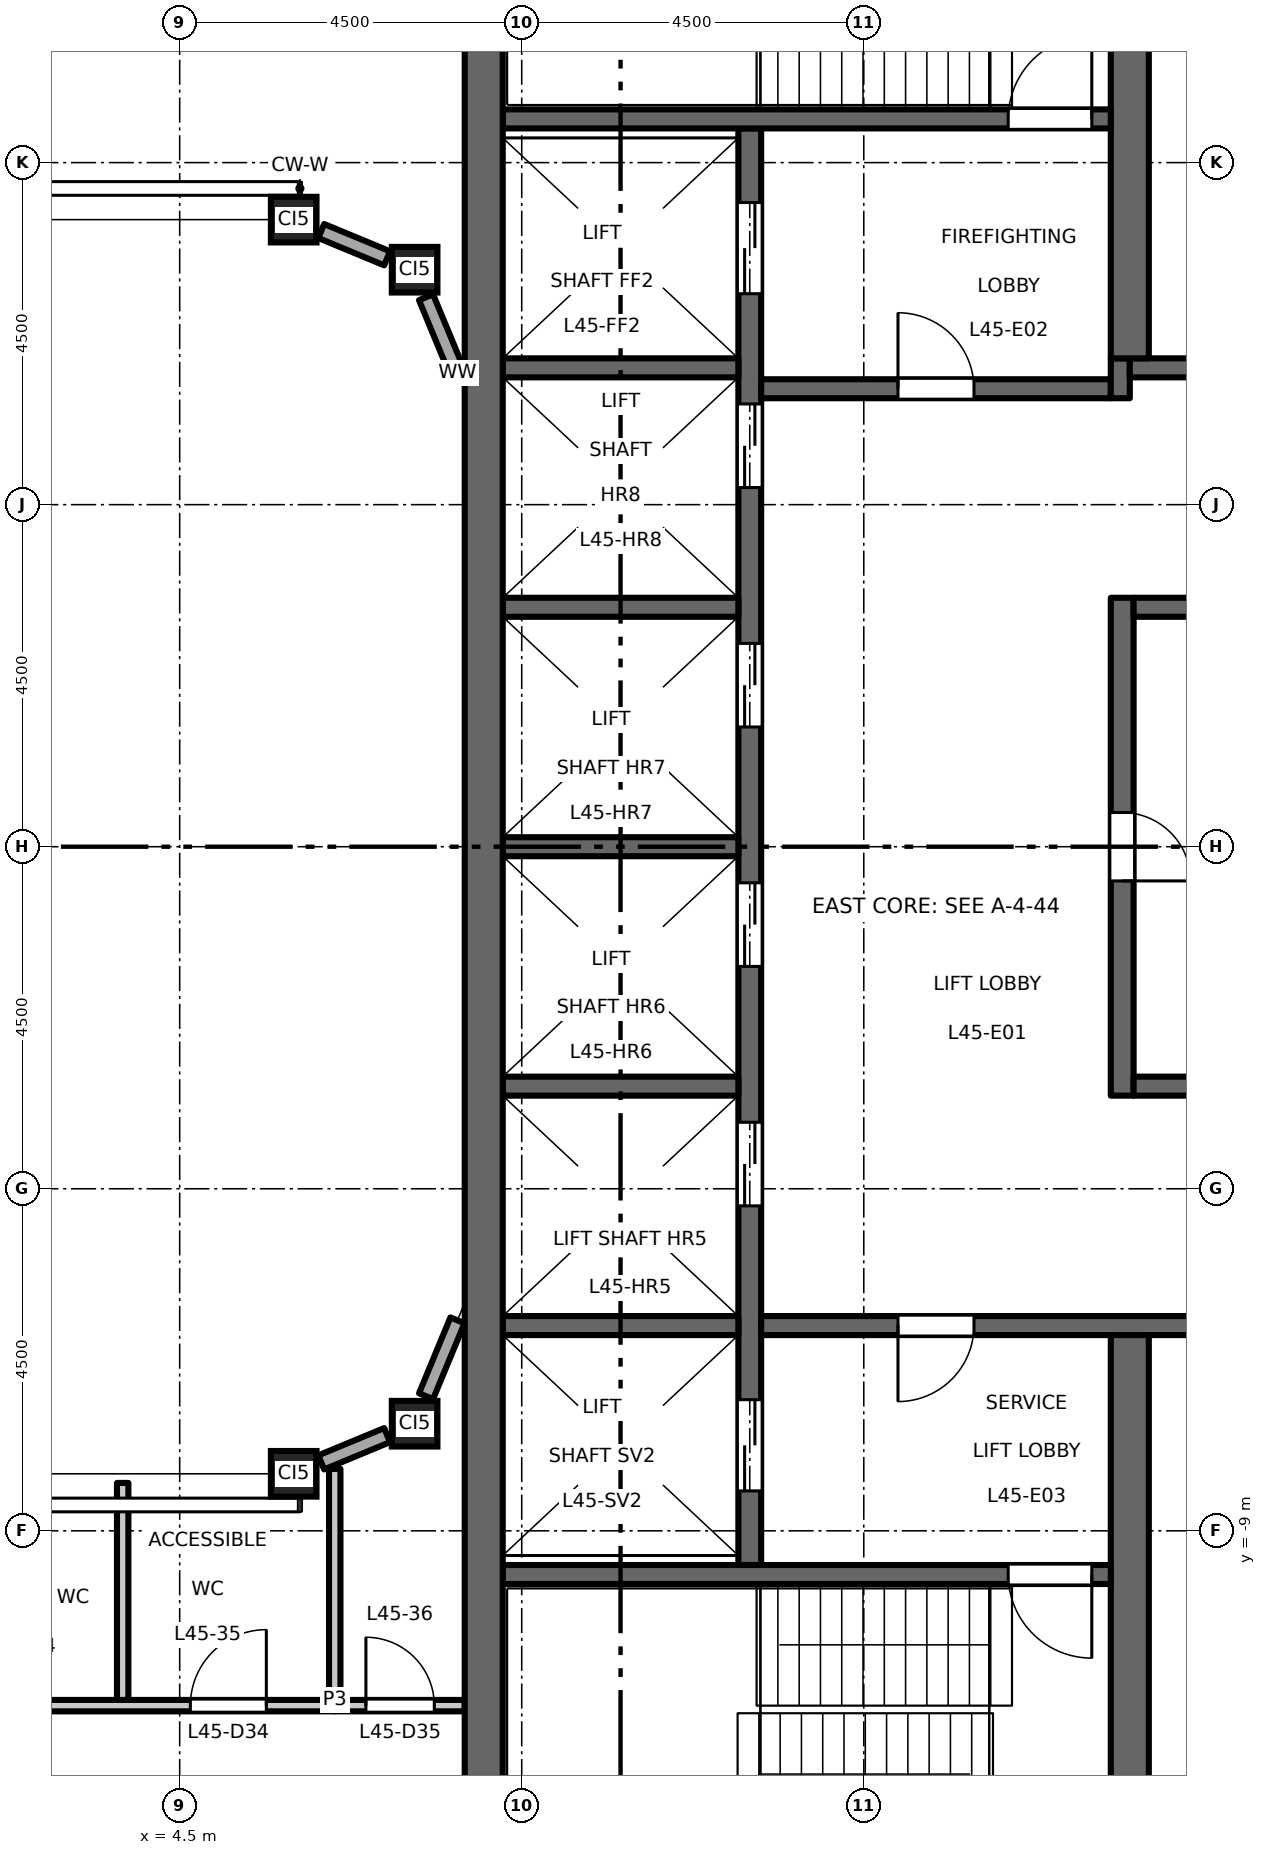
"""IFC4 building model, lengths in metres.
Left out: names, types, materials, properties, quantities, classifications, styles, units other than length and angle.
Written with IfcOpenShell. Run it as: python <this file> out.ifc"""

import sys

from ifc_helpers import new_model, si_unit, direction, frame, frame_2d, origin, origin_2d, place, context, subcontext, project, spatial, rectangle, hollow_rectangle, extrude, element, fill, save


model = new_model("IFC4")
c1 = context("Model", 3, precision=1e-05, world=origin(), true_north=direction((0.0, 1.0)))
c2 = subcontext(c1, "Body", "Model", "MODEL_VIEW")
j1 = project(units=[si_unit("LENGTHUNIT", "METRE"), si_unit("PLANEANGLEUNIT", "RADIAN")], contexts=[c1])
p1 = place(None, origin())
s1 = spatial("IfcSite", under=j1, at=p1, CompositionType="ELEMENT")
p2 = place(p1, origin())
s2 = spatial("IfcBuilding", under=s1, at=p2, CompositionType="ELEMENT")
p3 = place(p2, frame((0.0, 0.0, 210.7)))
s3 = spatial("IfcBuildingStorey", under=s2, at=p3, CompositionType="ELEMENT", Elevation=210.7)
for number, where, z_axis, x_axis in (
    (1, (6.0, -8.25, 0.0), (0.0, 0.0, 1.0), (1.0, 0.0, 0.0)),
    (2, (7.591, -7.591, 0.0), (0.0, 0.0, 1.0), (1.0, 0.0, 0.0)),
    (3, (6.0, 8.25, 0.0), (0.0, 0.0, 1.0), (1.0, 0.0, 0.0)),
    (4, (7.591, 7.591, 0.0), (0.0, 0.0, 1.0), (1.0, 0.0, 0.0)),
):
    element("IfcColumn", number, at=place(p3, frame(where, z_axis=z_axis, x_axis=x_axis)), inside=s3, PredefinedType="COLUMN", context=c2, shape_type="SweptSolid", body=[
        extrude(hollow_rectangle(XDim=0.6, YDim=0.6, WallThickness=0.032, at=origin_2d()), origin(), (0.0, 0.0, 1.0), 4.5),
    ])
p4 = place(p3, frame((12.0, -9.45, 0.0), z_axis=(0.0, 0.0, 1.0), x_axis=(0.0, 1.0, 0.0)))
e5 = element("IfcWall", 5, at=p4, inside=s3, PredefinedType="SHEAR", context=c2, shape_type="SweptSolid", body=[
    extrude(rectangle(XDim=18.9, YDim=0.3, at=frame_2d((9.45, 0.0))), origin(), (0.0, 0.0, 1.0), 4.35),
])
p5 = place(p4, frame((4.725, 0.0, 0.0)))
e6 = element("IfcOpeningElement", 6, at=p5, cuts=e5, PredefinedType="OPENING", context=c2, shape_type="SweptSolid", body=[
    extrude(rectangle(XDim=1.1, YDim=2.1, at=frame_2d((0.55, 1.05))), frame((0.0, 0.16, 0.0), z_axis=(0.0, -1.0, 0.0), x_axis=(1.0, 0.0, 0.0)), (0.0, 0.0, 1.0), 0.32),
])
p6 = place(p4, frame((7.875, 0.0, 0.0)))
e7 = element("IfcOpeningElement", 7, at=p6, cuts=e5, PredefinedType="OPENING", context=c2, shape_type="SweptSolid", body=[
    extrude(rectangle(XDim=1.1, YDim=2.1, at=frame_2d((0.55, 1.05))), frame((0.0, 0.16, 0.0), z_axis=(0.0, -1.0, 0.0), x_axis=(1.0, 0.0, 0.0)), (0.0, 0.0, 1.0), 0.32),
])
p7 = place(p4, frame((11.025, 0.0, 0.0)))
e8 = element("IfcOpeningElement", 8, at=p7, cuts=e5, PredefinedType="OPENING", context=c2, shape_type="SweptSolid", body=[
    extrude(rectangle(XDim=1.1, YDim=2.1, at=frame_2d((0.55, 1.05))), frame((0.0, 0.16, 0.0), z_axis=(0.0, -1.0, 0.0), x_axis=(1.0, 0.0, 0.0)), (0.0, 0.0, 1.0), 0.32),
])
p8 = place(p4, frame((14.175, 0.0, 0.0)))
e9 = element("IfcOpeningElement", 9, at=p8, cuts=e5, PredefinedType="OPENING", context=c2, shape_type="SweptSolid", body=[
    extrude(rectangle(XDim=1.1, YDim=2.1, at=frame_2d((0.55, 1.05))), frame((0.0, 0.16, 0.0), z_axis=(0.0, -1.0, 0.0), x_axis=(1.0, 0.0, 0.0)), (0.0, 0.0, 1.0), 0.32),
])
p9 = place(p4, frame((16.725, 0.0, 0.0)))
e10 = element("IfcOpeningElement", 10, at=p9, cuts=e5, PredefinedType="OPENING", context=c2, shape_type="SweptSolid", body=[
    extrude(rectangle(XDim=1.2, YDim=2.1, at=frame_2d((0.6, 1.05))), frame((0.0, 0.16, 0.0), z_axis=(0.0, -1.0, 0.0), x_axis=(1.0, 0.0, 0.0)), (0.0, 0.0, 1.0), 0.32),
])
p10 = place(p4, frame((0.975, 0.0, 0.0)))
e11 = element("IfcOpeningElement", 11, at=p10, cuts=e5, PredefinedType="OPENING", context=c2, shape_type="SweptSolid", body=[
    extrude(rectangle(XDim=1.2, YDim=2.1, at=frame_2d((0.6, 1.05))), frame((0.0, 0.16, 0.0), z_axis=(0.0, -1.0, 0.0), x_axis=(1.0, 0.0, 0.0)), (0.0, 0.0, 1.0), 0.32),
])
p11 = place(p3, frame((12.15, 6.025, 0.0), z_axis=(0.0, 0.0, 1.0), x_axis=(1.0, 0.0, 0.0)))
e12 = element("IfcWall", 12, at=p11, inside=s3, PredefinedType="SHEAR", context=c2, shape_type="SweptSolid", body=[
    extrude(rectangle(XDim=4.6, YDim=0.25, at=frame_2d((2.3, 0.0))), origin(), (0.0, 0.0, 1.0), 4.35),
])
p12 = place(p11, frame((1.8, 0.0, 0.0)))
e13 = element("IfcOpeningElement", 13, at=p12, cuts=e12, PredefinedType="OPENING", context=c2, shape_type="SweptSolid", body=[
    extrude(rectangle(XDim=1.0, YDim=2.1, at=frame_2d((0.5, 1.05))), frame((0.0, 0.135, 0.0), z_axis=(0.0, -1.0, 0.0), x_axis=(1.0, 0.0, 0.0)), (0.0, 0.0, 1.0), 0.27),
])
p13 = place(p3, frame((16.875, 5.9, 0.0), z_axis=(0.0, 0.0, 1.0), x_axis=(0.0, 1.0, 0.0)))
e14 = element("IfcWall", 14, at=p13, inside=s3, PredefinedType="SHEAR", context=c2, shape_type="SweptSolid", body=[
    extrude(rectangle(XDim=0.525, YDim=0.25, at=frame_2d((0.263, 0.0))), origin(), (0.0, 0.0, 1.0), 4.35),
])
p14 = place(p3, frame((17.0, 6.3, 0.0), z_axis=(0.0, 0.0, 1.0), x_axis=(1.0, 0.0, 0.0)))
e15 = element("IfcWall", 15, at=p14, inside=s3, PredefinedType="SHEAR", context=c2, shape_type="SweptSolid", body=[
    extrude(rectangle(XDim=4.25, YDim=0.25, at=frame_2d((2.125, 0.0))), origin(), (0.0, 0.0, 1.0), 4.35),
])
p15 = place(p3, frame((12.15, -6.3, 0.0), z_axis=(0.0, 0.0, 1.0), x_axis=(1.0, 0.0, 0.0)))
e16 = element("IfcWall", 16, at=p15, inside=s3, PredefinedType="SHEAR", context=c2, shape_type="SweptSolid", body=[
    extrude(rectangle(XDim=9.1, YDim=0.25, at=frame_2d((4.55, 0.0))), origin(), (0.0, 0.0, 1.0), 4.35),
])
p16 = place(p15, frame((1.8, 0.0, 0.0)))
e17 = element("IfcOpeningElement", 17, at=p16, cuts=e16, PredefinedType="OPENING", context=c2, shape_type="SweptSolid", body=[
    extrude(rectangle(XDim=1.0, YDim=2.1, at=frame_2d((0.5, 1.05))), frame((0.0, 0.135, 0.0), z_axis=(0.0, -1.0, 0.0), x_axis=(1.0, 0.0, 0.0)), (0.0, 0.0, 1.0), 0.27),
])
p17 = place(p3, frame((16.9, -3.275, 0.0), z_axis=(0.0, 0.0, 1.0), x_axis=(0.0, 1.0, 0.0)))
e18 = element("IfcWall", 18, at=p17, inside=s3, PredefinedType="SHEAR", context=c2, shape_type="SweptSolid", body=[
    extrude(rectangle(XDim=6.55, YDim=0.3, at=frame_2d((3.275, 0.0))), origin(), (0.0, 0.0, 1.0), 4.35),
])
p18 = place(p17, frame((2.825, 0.0, 0.0)))
e19 = element("IfcOpeningElement", 19, at=p18, cuts=e18, PredefinedType="OPENING", context=c2, shape_type="SweptSolid", body=[
    extrude(rectangle(XDim=0.9, YDim=2.1, at=frame_2d((0.45, 1.05))), frame((0.0, 0.16, 0.0), z_axis=(0.0, -1.0, 0.0), x_axis=(1.0, 0.0, 0.0)), (0.0, 0.0, 1.0), 0.32),
])
for number, where, z_axis, x_axis in (
    (20, (17.05, 3.15, 0.0), (0.0, 0.0, 1.0), (1.0, 0.0, 0.0)),
    (21, (17.05, -3.15, 0.0), (0.0, 0.0, 1.0), (1.0, 0.0, 0.0)),
):
    element("IfcWall", number, at=place(p3, frame(where, z_axis=z_axis, x_axis=x_axis)), inside=s3, PredefinedType="SHEAR", context=c2, shape_type="SweptSolid", body=[
        extrude(rectangle(XDim=4.2, YDim=0.25, at=frame_2d((2.1, 0.0))), origin(), (0.0, 0.0, 1.0), 4.35),
    ])
for number, where, z_axis, x_axis in (
    (22, (17.0, 6.425, 0.0), (0.0, 0.0, 1.0), (0.0, 1.0, 0.0)),
    (23, (17.0, -13.0, 0.0), (0.0, 0.0, 1.0), (0.0, 1.0, 0.0)),
):
    element("IfcWall", number, at=place(p3, frame(where, z_axis=z_axis, x_axis=x_axis)), inside=s3, PredefinedType="SHEAR", context=c2, shape_type="SweptSolid", body=[
        extrude(rectangle(XDim=6.575, YDim=0.5, at=frame_2d((3.288, 0.0))), origin(), (0.0, 0.0, 1.0), 4.35),
    ])
for number, where, z_axis, x_axis in (
    (24, (8.75, 0.0, 0.0), (0.0, 0.0, 1.0), (1.0, 0.0, 0.0)),
    (25, (8.75, 3.15, 0.0), (0.0, 0.0, 1.0), (1.0, 0.0, 0.0)),
    (26, (8.75, 6.3, 0.0), (0.0, 0.0, 1.0), (1.0, 0.0, 0.0)),
    (27, (8.75, -3.15, 0.0), (0.0, 0.0, 1.0), (1.0, 0.0, 0.0)),
    (28, (8.75, -6.3, 0.0), (0.0, 0.0, 1.0), (1.0, 0.0, 0.0)),
):
    element("IfcWall", number, at=place(p3, frame(where, z_axis=z_axis, x_axis=x_axis)), inside=s3, PredefinedType="SHEAR", context=c2, shape_type="SweptSolid", body=[
        extrude(rectangle(XDim=3.1, YDim=0.25, at=frame_2d((1.55, 0.0))), origin(), (0.0, 0.0, 1.0), 4.35),
    ])
p19 = place(p3, frame((8.75, 9.575, 0.0), z_axis=(0.0, 0.0, 1.0), x_axis=(1.0, 0.0, 0.0)))
e29 = element("IfcWall", 29, at=p19, inside=s3, PredefinedType="SHEAR", context=c2, shape_type="SweptSolid", body=[
    extrude(rectangle(XDim=8.0, YDim=0.25, at=frame_2d((4.0, 0.0))), origin(), (0.0, 0.0, 1.0), 4.35),
])
p20 = place(p19, frame((6.65, 0.0, 0.0)))
e30 = element("IfcOpeningElement", 30, at=p20, cuts=e29, PredefinedType="OPENING", context=c2, shape_type="SweptSolid", body=[
    extrude(rectangle(XDim=1.1, YDim=2.1, at=frame_2d((0.55, 1.05))), frame((0.0, 0.135, 0.0), z_axis=(0.0, -1.0, 0.0), x_axis=(1.0, 0.0, 0.0)), (0.0, 0.0, 1.0), 0.27),
])
p21 = place(p3, frame((8.75, -9.575, 0.0), z_axis=(0.0, 0.0, 1.0), x_axis=(1.0, 0.0, 0.0)))
e31 = element("IfcWall", 31, at=p21, inside=s3, PredefinedType="SHEAR", context=c2, shape_type="SweptSolid", body=[
    extrude(rectangle(XDim=8.0, YDim=0.25, at=frame_2d((4.0, 0.0))), origin(), (0.0, 0.0, 1.0), 4.35),
])
p22 = place(p21, frame((6.65, 0.0, 0.0)))
e32 = element("IfcOpeningElement", 32, at=p22, cuts=e31, PredefinedType="OPENING", context=c2, shape_type="SweptSolid", body=[
    extrude(rectangle(XDim=1.1, YDim=2.1, at=frame_2d((0.55, 1.05))), frame((0.0, 0.135, 0.0), z_axis=(0.0, -1.0, 0.0), x_axis=(1.0, 0.0, 0.0)), (0.0, 0.0, 1.0), 0.27),
])
p23 = place(p3, frame((8.5, -13.0, 0.0), z_axis=(0.0, 0.0, 1.0), x_axis=(0.0, 1.0, 0.0)))
e33 = element("IfcWall", 33, at=p23, inside=s3, PredefinedType="SHEAR", context=c2, shape_type="SweptSolid", body=[
    extrude(rectangle(XDim=26.0, YDim=0.5, at=frame_2d((13.0, 0.0))), origin(), (0.0, 0.0, 1.0), 4.35),
])
p24 = place(p3, frame((6.362, -8.1, 0.0), z_axis=(0.0, 0.0, 1.0), x_axis=(0.923829670615, 0.382803787458, 0.0)))
e34 = element("IfcWall", 34, at=p24, inside=s3, PredefinedType="STANDARD", context=c2, shape_type="SweptSolid", body=[
    extrude(rectangle(XDim=0.938, YDim=0.2, at=frame_2d((0.469, 0.0))), origin(), (0.0, 0.0, 1.0), 3.918),
])
for number, where, z_axis, x_axis in (
    (35, (7.741, -7.229, 0.0), (0.0, 0.0, 1.0), (0.383, 0.924, 0.0)),
    (36, (8.154, 6.231, 0.0), (0.0, 0.0, 1.0), (-0.383, 0.924, 0.0)),
):
    element("IfcWall", number, at=place(p3, frame(where, z_axis=z_axis, x_axis=x_axis)), inside=s3, PredefinedType="STANDARD", context=c2, shape_type="SweptSolid", body=[
        extrude(rectangle(XDim=1.08, YDim=0.2, at=frame_2d((0.54, 0.0))), origin(), (0.0, 0.0, 1.0), 3.918),
    ])
p25 = place(p3, frame((7.229, 7.741, 0.0), z_axis=(0.0, 0.0, 1.0), x_axis=(-0.923829670615, 0.382803787458, 0.0)))
e37 = element("IfcWall", 37, at=p25, inside=s3, PredefinedType="STANDARD", context=c2, shape_type="SweptSolid", body=[
    extrude(rectangle(XDim=0.938, YDim=0.2, at=frame_2d((0.469, 0.0))), origin(), (0.0, 0.0, 1.0), 3.918),
])
p26 = place(p3, frame((-8.25, -11.3, 0.0), z_axis=(0.0, 0.0, 1.0), x_axis=(1.0, 0.0, 0.0)))
e38 = element("IfcWall", 38, at=p26, inside=s3, PredefinedType="PARTITIONING", context=c2, shape_type="SweptSolid", body=[
    extrude(rectangle(XDim=14.79, YDim=0.15, at=frame_2d((7.395, 0.0))), origin(), (0.0, 0.0, 1.0), 4.35),
])
p27 = place(p26, frame((2.6, 0.0, 0.0)))
e39 = element("IfcOpeningElement", 39, at=p27, cuts=e38, PredefinedType="OPENING", context=c2, shape_type="SweptSolid", body=[
    extrude(rectangle(XDim=1.0, YDim=2.1, at=frame_2d((0.5, 1.05))), frame((0.0, 0.085, 0.0), z_axis=(0.0, -1.0, 0.0), x_axis=(1.0, 0.0, 0.0)), (0.0, 0.0, 1.0), 0.17),
])
p28 = place(p26, frame((8.85, 0.0, 0.0)))
e40 = element("IfcOpeningElement", 40, at=p28, cuts=e38, PredefinedType="OPENING", context=c2, shape_type="SweptSolid", body=[
    extrude(rectangle(XDim=1.0, YDim=2.1, at=frame_2d((0.5, 1.05))), frame((0.0, 0.085, 0.0), z_axis=(0.0, -1.0, 0.0), x_axis=(1.0, 0.0, 0.0)), (0.0, 0.0, 1.0), 0.17),
])
p29 = place(p26, frame((12.89, 0.0, 0.0)))
e41 = element("IfcOpeningElement", 41, at=p29, cuts=e38, PredefinedType="OPENING", context=c2, shape_type="SweptSolid", body=[
    extrude(rectangle(XDim=1.0, YDim=2.1, at=frame_2d((0.5, 1.05))), frame((0.0, 0.085, 0.0), z_axis=(0.0, -1.0, 0.0), x_axis=(1.0, 0.0, 0.0)), (0.0, 0.0, 1.0), 0.17),
])
p30 = place(p3, frame((6.54, -11.3, 0.0), z_axis=(0.0, 0.0, 1.0), x_axis=(1.0, 0.0, 0.0)))
e42 = element("IfcWall", 42, at=p30, inside=s3, PredefinedType="PARTITIONING", context=c2, shape_type="SweptSolid", body=[
    extrude(rectangle(XDim=1.71, YDim=0.15, at=frame_2d((0.855, 0.0))), origin(), (0.0, 0.0, 1.0), 4.35),
])
p31 = place(p30, frame((0.41, 0.0, 0.0)))
e43 = element("IfcOpeningElement", 43, at=p31, cuts=e42, PredefinedType="OPENING", context=c2, shape_type="SweptSolid", body=[
    extrude(rectangle(XDim=0.9, YDim=2.1, at=frame_2d((0.45, 1.05))), frame((0.0, 0.085, 0.0), z_axis=(0.0, -1.0, 0.0), x_axis=(1.0, 0.0, 0.0)), (0.0, 0.0, 1.0), 0.17),
])
p32 = place(p3, frame((3.75, -11.225, 0.0), z_axis=(0.0, 0.0, 1.0), x_axis=(0.0, 1.0, 0.0)))
e44 = element("IfcWall", 44, at=p32, inside=s3, PredefinedType="PARTITIONING", context=c2, shape_type="SweptSolid", body=[
    extrude(rectangle(XDim=2.855, YDim=0.15, at=frame_2d((1.427, 0.0))), origin(), (0.0, 0.0, 1.0), 4.35),
])
p33 = place(p3, frame((6.54, -11.225, 0.0), z_axis=(0.0, 0.0, 1.0), x_axis=(0.0, 1.0, 0.0)))
e45 = element("IfcWall", 45, at=p33, inside=s3, PredefinedType="PARTITIONING", context=c2, shape_type="SweptSolid", body=[
    extrude(rectangle(XDim=3.039, YDim=0.15, at=frame_2d((1.52, 0.0))), origin(), (0.0, 0.0, 1.0), 4.35),
])
p34 = place(p12, origin())
e46 = element("IfcDoor", 46, at=p34, inside=s3, OperationType="SINGLE_SWING_RIGHT", PredefinedType="DOOR", context=c2, shape_type="SweptSolid", body=[
    extrude(rectangle(XDim=1.0, YDim=2.1, at=frame_2d((0.5, 1.05))), frame((0.0, 0.025, 0.0), z_axis=(0.0, -1.0, 0.0), x_axis=(1.0, 0.0, 0.0)), (0.0, 0.0, 1.0), 0.05),
])
fill(e13, e46)
p35 = place(p16, origin())
e47 = element("IfcDoor", 47, at=p35, inside=s3, OperationType="SINGLE_SWING_LEFT", PredefinedType="DOOR", context=c2, shape_type="SweptSolid", body=[
    extrude(rectangle(XDim=1.0, YDim=2.1, at=frame_2d((0.5, 1.05))), frame((0.0, 0.025, 0.0), z_axis=(0.0, -1.0, 0.0), x_axis=(1.0, 0.0, 0.0)), (0.0, 0.0, 1.0), 0.05),
])
fill(e17, e47)
p36 = place(p20, origin())
e48 = element("IfcDoor", 48, at=p36, inside=s3, OperationType="SINGLE_SWING_LEFT", PredefinedType="DOOR", context=c2, shape_type="SweptSolid", body=[
    extrude(rectangle(XDim=1.1, YDim=2.1, at=frame_2d((0.55, 1.05))), frame((0.0, 0.025, 0.0), z_axis=(0.0, -1.0, 0.0), x_axis=(1.0, 0.0, 0.0)), (0.0, 0.0, 1.0), 0.05),
])
fill(e30, e48)
p37 = place(p22, origin())
e49 = element("IfcDoor", 49, at=p37, inside=s3, OperationType="SINGLE_SWING_RIGHT", PredefinedType="DOOR", context=c2, shape_type="SweptSolid", body=[
    extrude(rectangle(XDim=1.1, YDim=2.1, at=frame_2d((0.55, 1.05))), frame((0.0, 0.025, 0.0), z_axis=(0.0, -1.0, 0.0), x_axis=(1.0, 0.0, 0.0)), (0.0, 0.0, 1.0), 0.05),
])
fill(e32, e49)
p38 = place(p5, origin())
e50 = element("IfcDoor", 50, at=p38, inside=s3, OperationType="DOUBLE_DOOR_SLIDING", PredefinedType="DOOR", context=c2, shape_type="SweptSolid", body=[
    extrude(rectangle(XDim=1.1, YDim=2.1, at=frame_2d((0.55, 1.05))), frame((0.0, 0.025, 0.0), z_axis=(0.0, -1.0, 0.0), x_axis=(1.0, 0.0, 0.0)), (0.0, 0.0, 1.0), 0.05),
])
fill(e6, e50)
p39 = place(p6, origin())
e51 = element("IfcDoor", 51, at=p39, inside=s3, OperationType="DOUBLE_DOOR_SLIDING", PredefinedType="DOOR", context=c2, shape_type="SweptSolid", body=[
    extrude(rectangle(XDim=1.1, YDim=2.1, at=frame_2d((0.55, 1.05))), frame((0.0, 0.025, 0.0), z_axis=(0.0, -1.0, 0.0), x_axis=(1.0, 0.0, 0.0)), (0.0, 0.0, 1.0), 0.05),
])
fill(e7, e51)
p40 = place(p7, origin())
e52 = element("IfcDoor", 52, at=p40, inside=s3, OperationType="DOUBLE_DOOR_SLIDING", PredefinedType="DOOR", context=c2, shape_type="SweptSolid", body=[
    extrude(rectangle(XDim=1.1, YDim=2.1, at=frame_2d((0.55, 1.05))), frame((0.0, 0.025, 0.0), z_axis=(0.0, -1.0, 0.0), x_axis=(1.0, 0.0, 0.0)), (0.0, 0.0, 1.0), 0.05),
])
fill(e8, e52)
p41 = place(p8, origin())
e53 = element("IfcDoor", 53, at=p41, inside=s3, OperationType="DOUBLE_DOOR_SLIDING", PredefinedType="DOOR", context=c2, shape_type="SweptSolid", body=[
    extrude(rectangle(XDim=1.1, YDim=2.1, at=frame_2d((0.55, 1.05))), frame((0.0, 0.025, 0.0), z_axis=(0.0, -1.0, 0.0), x_axis=(1.0, 0.0, 0.0)), (0.0, 0.0, 1.0), 0.05),
])
fill(e9, e53)
p42 = place(p9, origin())
e54 = element("IfcDoor", 54, at=p42, inside=s3, OperationType="DOUBLE_DOOR_SLIDING", PredefinedType="DOOR", context=c2, shape_type="SweptSolid", body=[
    extrude(rectangle(XDim=1.2, YDim=2.1, at=frame_2d((0.6, 1.05))), frame((0.0, 0.025, 0.0), z_axis=(0.0, -1.0, 0.0), x_axis=(1.0, 0.0, 0.0)), (0.0, 0.0, 1.0), 0.05),
])
fill(e10, e54)
p43 = place(p10, origin())
e55 = element("IfcDoor", 55, at=p43, inside=s3, OperationType="DOUBLE_DOOR_SLIDING", PredefinedType="DOOR", context=c2, shape_type="SweptSolid", body=[
    extrude(rectangle(XDim=1.2, YDim=2.1, at=frame_2d((0.6, 1.05))), frame((0.0, 0.025, 0.0), z_axis=(0.0, -1.0, 0.0), x_axis=(1.0, 0.0, 0.0)), (0.0, 0.0, 1.0), 0.05),
])
fill(e11, e55)
p44 = place(p18, origin())
e56 = element("IfcDoor", 56, at=p44, inside=s3, OperationType="SINGLE_SWING_LEFT", PredefinedType="DOOR", context=c2, shape_type="SweptSolid", body=[
    extrude(rectangle(XDim=0.9, YDim=2.1, at=frame_2d((0.45, 1.05))), frame((0.0, 0.025, 0.0), z_axis=(0.0, -1.0, 0.0), x_axis=(1.0, 0.0, 0.0)), (0.0, 0.0, 1.0), 0.05),
])
fill(e19, e56)
p45 = place(p29, origin())
e57 = element("IfcDoor", 57, at=p45, inside=s3, OperationType="SINGLE_SWING_RIGHT", PredefinedType="DOOR", context=c2, shape_type="SweptSolid", body=[
    extrude(rectangle(XDim=1.0, YDim=2.1, at=frame_2d((0.5, 1.05))), frame((0.0, 0.025, 0.0), z_axis=(0.0, -1.0, 0.0), x_axis=(1.0, 0.0, 0.0)), (0.0, 0.0, 1.0), 0.05),
])
fill(e41, e57)
p46 = place(p31, origin())
e58 = element("IfcDoor", 58, at=p46, inside=s3, OperationType="SINGLE_SWING_LEFT", PredefinedType="DOOR", context=c2, shape_type="SweptSolid", body=[
    extrude(rectangle(XDim=0.9, YDim=2.1, at=frame_2d((0.45, 1.05))), frame((0.0, 0.025, 0.0), z_axis=(0.0, -1.0, 0.0), x_axis=(1.0, 0.0, 0.0)), (0.0, 0.0, 1.0), 0.05),
])
fill(e43, e58)
save(model, sys.argv[1])
